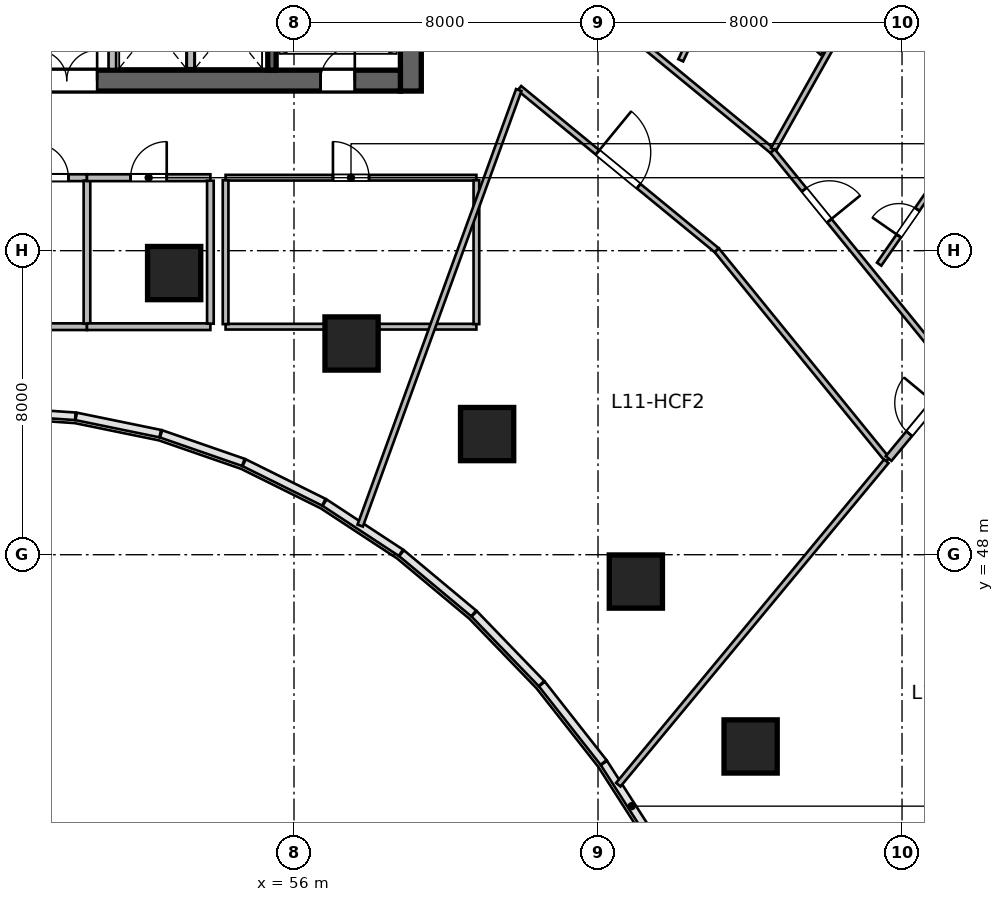
"""IFC4 building model, lengths in metres.
Left out: names, types, materials, properties, quantities, classifications, styles, units other than length and angle.
Written with IfcOpenShell. Run it as: python <this file> out.ifc"""

import sys

from ifc_helpers import new_model, si_unit, direction, frame, frame_2d, origin, origin_2d, place, context, subcontext, project, spatial, rectangle, circle, extrude, source, transform, mapped, element, fill, save


model = new_model("IFC4")
c1 = context("Model", 3, precision=1e-05, world=origin(), true_north=direction((0.0, 1.0)))
c2 = subcontext(c1, "Body", "Model", "MODEL_VIEW")
j1 = project(units=[si_unit("LENGTHUNIT", "METRE"), si_unit("PLANEANGLEUNIT", "RADIAN")], contexts=[c1])
p1 = place(None, origin())
s1 = spatial("IfcSite", under=j1, at=p1, CompositionType="ELEMENT")
p2 = place(p1, origin())
s2 = spatial("IfcBuilding", under=s1, at=p2, CompositionType="ELEMENT")
p3 = place(p2, frame((0.0, 0.0, 53.4)))
s3 = spatial("IfcBuildingStorey", under=s2, at=p3, CompositionType="ELEMENT", Elevation=53.4)
m1 = source(origin(), c2, "Body", "SweptSolid", [
    extrude(rectangle(XDim=12.0, YDim=0.55, at=frame_2d((6.0, 0.0))), origin(), (0.0, 0.0, 1.0), 3.6),
])
p4 = place(p3, frame((59.075, 60.2, 0.0), z_axis=(0.0, 0.0, 1.0), x_axis=(0.0, 1.0, 0.0)))
e1 = element("IfcWall", 1, at=p4, inside=s3, PredefinedType="SHEAR", context=c2, shape_type="MappedRepresentation", body=[
    mapped(m1, transform((0.0, 0.0, 0.0), scale=1.0)),
])
m2 = source(origin(), c2, "Body", "SweptSolid", [
    extrude(rectangle(XDim=21.6, YDim=0.55, at=frame_2d((10.8, 0.0))), origin(), (0.0, 0.0, 1.0), 3.6),
])
p5 = place(p3, frame((37.2, 60.475, 0.0), z_axis=(0.0, 0.0, 1.0), x_axis=(1.0, 0.0, 0.0)))
e2 = element("IfcWall", 2, at=p5, inside=s3, PredefinedType="SHEAR", context=c2, shape_type="MappedRepresentation", body=[
    mapped(m2, transform((0.0, 0.0, 0.0), scale=1.0)),
])
p6 = place(p5, frame((1.1, 0.0, 0.0)))
e3 = element("IfcOpeningElement", 3, at=p6, cuts=e2, PredefinedType="OPENING", context=c2, shape_type="SweptSolid", body=[
    extrude(rectangle(XDim=1.15, YDim=2.15, at=frame_2d((0.575, 1.075))), frame((0.0, 0.285, 0.0), z_axis=(0.0, -1.0, 0.0), x_axis=(1.0, 0.0, 0.0)), (0.0, 0.0, 1.0), 0.57),
])
p7 = place(p5, frame((19.5, 0.0, 0.0)))
e4 = element("IfcOpeningElement", 4, at=p7, cuts=e2, PredefinedType="OPENING", context=c2, shape_type="SweptSolid", body=[
    extrude(rectangle(XDim=0.9, YDim=2.1, at=frame_2d((0.45, 1.05))), frame((0.0, 0.285, 0.0), z_axis=(0.0, -1.0, 0.0), x_axis=(1.0, 0.0, 0.0)), (0.0, 0.0, 1.0), 0.57),
])
p8 = place(p5, frame((12.02, 0.0, 0.0)))
e5 = element("IfcOpeningElement", 5, at=p8, cuts=e2, PredefinedType="OPENING", context=c2, shape_type="SweptSolid", body=[
    extrude(rectangle(XDim=1.6, YDim=2.15, at=frame_2d((0.8, 1.075))), frame((0.0, 0.285, 0.0), z_axis=(0.0, -1.0, 0.0), x_axis=(1.0, 0.0, 0.0)), (0.0, 0.0, 1.0), 0.57),
])
m3 = source(origin(), c2, "Body", "SweptSolid", [
    extrude(rectangle(XDim=10.9, YDim=0.22, at=frame_2d((5.45, 0.0))), origin(), (0.0, 0.0, 1.0), 3.6),
])
p9 = place(p3, frame((55.42, 60.75, 0.0), z_axis=(0.0, 0.0, 1.0), x_axis=(0.0, 1.0, 0.0)))
e6 = element("IfcWall", 6, at=p9, inside=s3, PredefinedType="SHEAR", context=c2, shape_type="MappedRepresentation", body=[
    mapped(m3, transform((0.0, 0.0, 0.0), scale=1.0)),
])
p10 = place(p9, frame((9.495, 0.0, 0.0)))
e7 = element("IfcOpeningElement", 7, at=p10, cuts=e6, PredefinedType="OPENING", context=c2, shape_type="SweptSolid", body=[
    extrude(rectangle(XDim=1.15, YDim=2.15, at=frame_2d((0.575, 1.075))), frame((0.0, 0.12, 0.0), z_axis=(0.0, -1.0, 0.0), x_axis=(1.0, 0.0, 0.0)), (0.0, 0.0, 1.0), 0.24),
])
m4 = source(origin(), c2, "Body", "SweptSolid", [
    extrude(circle(Radius=0.7, at=origin_2d()), origin(), (0.0, 0.0, 1.0), 3.6),
])
for number, where, z_axis, x_axis in (
    (8, (52.846, 55.411, 0.0), (0.0, 0.0, 1.0), (0.143, 0.99, 0.0)),
    (9, (57.515, 53.558, 0.0), (0.0, 0.0, 1.0), (0.289, 0.957, 0.0)),
    (10, (61.082, 51.175, 0.0), (0.0, 0.0, 1.0), (0.409, 0.912, 0.0)),
    (11, (64.996, 47.294, 0.0), (0.0, 0.0, 1.0), (0.558, 0.83, 0.0)),
    (12, (68.015, 42.955, 0.0), (0.0, 0.0, 1.0), (0.691, 0.723, 0.0)),
):
    element("IfcColumn", number, at=place(p3, frame(where, z_axis=z_axis, x_axis=x_axis)), inside=s3, PredefinedType="COLUMN", context=c2, shape_type="MappedRepresentation", body=[
        mapped(m4, transform((0.0, 0.0, 0.0), scale=1.0)),
    ])
m5 = source(origin(), c2, "Body", "SweptSolid", [
    extrude(rectangle(XDim=2.24, YDim=0.2, at=frame_2d((1.12, 0.0))), origin(), (0.0, 0.0, 1.0), 3.36),
])
p11 = place(p3, frame((51.22, 60.78, 0.0), z_axis=(0.0, 0.0, 1.0), x_axis=(0.0, 1.0, 0.0)))
e13 = element("IfcWall", 13, at=p11, inside=s3, PredefinedType="SOLIDWALL", context=c2, shape_type="MappedRepresentation", body=[
    mapped(m5, transform((0.0, 0.0, 0.0), scale=1.0)),
])
m6 = source(origin(), c2, "Body", "SweptSolid", [
    extrude(rectangle(XDim=2.2, YDim=0.2, at=frame_2d((1.1, 0.0))), origin(), (0.0, 0.0, 1.0), 3.36),
])
p12 = place(p3, frame((53.28, 60.8, 0.0), z_axis=(0.0, 0.0, 1.0), x_axis=(0.0, 1.0, 0.0)))
e14 = element("IfcWall", 14, at=p12, inside=s3, PredefinedType="SOLIDWALL", context=c2, shape_type="MappedRepresentation", body=[
    mapped(m6, transform((0.0, 0.0, 0.0), scale=1.0)),
])
m7 = source(origin(), c2, "Body", "SweptSolid", [
    extrude(rectangle(XDim=4.176, YDim=0.175, at=frame_2d((2.088, 0.0))), origin(), (0.0, 0.0, 1.0), 3.36),
])
p13 = place(p3, frame((46.376, 54.0, 0.0), z_axis=(0.0, 0.0, 1.0), x_axis=(1.0, 0.0, 0.0)))
e15 = element("IfcWall", 15, at=p13, inside=s3, PredefinedType="PARTITIONING", context=c2, shape_type="MappedRepresentation", body=[
    mapped(m7, transform((0.0, 0.0, 0.0), scale=1.0)),
])
m8 = source(origin(), c2, "Body", "SweptSolid", [
    extrude(rectangle(XDim=4.176, YDim=0.18, at=frame_2d((2.088, 0.0))), origin(), (0.0, 0.0, 1.0), 3.36),
])
p14 = place(p3, frame((46.376, 57.92, 0.0), z_axis=(0.0, 0.0, 1.0), x_axis=(1.0, 0.0, 0.0)))
e16 = element("IfcWall", 16, at=p14, inside=s3, PredefinedType="PLUMBINGWALL", context=c2, shape_type="MappedRepresentation", body=[
    mapped(m8, transform((0.0, 0.0, 0.0), scale=1.0)),
])
p15 = place(p14, frame((2.788, 0.0, 0.0)))
e17 = element("IfcOpeningElement", 17, at=p15, cuts=e16, PredefinedType="OPENING", context=c2, shape_type="SweptSolid", body=[
    extrude(rectangle(XDim=0.9, YDim=2.08, at=frame_2d((0.45, 1.04))), frame((0.0, 0.1, 0.0), z_axis=(0.0, -1.0, 0.0), x_axis=(1.0, 0.0, 0.0)), (0.0, 0.0, 1.0), 0.2),
])
m9 = source(origin(), c2, "Body", "SweptSolid", [
    extrude(rectangle(XDim=3.763, YDim=0.175, at=frame_2d((1.881, 0.0))), origin(), (0.0, 0.0, 1.0), 3.36),
])
p16 = place(p3, frame((50.552, 54.079, 0.0), z_axis=(0.0, 0.0, 1.0), x_axis=(0.0, 1.0, 0.0)))
e18 = element("IfcWall", 18, at=p16, inside=s3, PredefinedType="PARTITIONING", context=c2, shape_type="MappedRepresentation", body=[
    mapped(m9, transform((0.0, 0.0, 0.0), scale=1.0)),
])
m10 = source(origin(), c2, "Body", "SweptSolid", [
    extrude(rectangle(XDim=3.248, YDim=0.175, at=frame_2d((1.624, 0.0))), origin(), (0.0, 0.0, 1.0), 3.36),
])
p17 = place(p3, frame((50.552, 54.0, 0.0), z_axis=(0.0, 0.0, 1.0), x_axis=(1.0, 0.0, 0.0)))
e19 = element("IfcWall", 19, at=p17, inside=s3, PredefinedType="PARTITIONING", context=c2, shape_type="MappedRepresentation", body=[
    mapped(m10, transform((0.0, 0.0, 0.0), scale=1.0)),
])
m11 = source(origin(), c2, "Body", "SweptSolid", [
    extrude(rectangle(XDim=3.248, YDim=0.18, at=frame_2d((1.624, 0.0))), origin(), (0.0, 0.0, 1.0), 3.36),
])
p18 = place(p3, frame((50.552, 57.92, 0.0), z_axis=(0.0, 0.0, 1.0), x_axis=(1.0, 0.0, 0.0)))
e20 = element("IfcWall", 20, at=p18, inside=s3, PredefinedType="PLUMBINGWALL", context=c2, shape_type="MappedRepresentation", body=[
    mapped(m11, transform((0.0, 0.0, 0.0), scale=1.0)),
])
p19 = place(p18, frame((1.149, 0.0, 0.0)))
e21 = element("IfcOpeningElement", 21, at=p19, cuts=e20, PredefinedType="OPENING", context=c2, shape_type="SweptSolid", body=[
    extrude(rectangle(XDim=0.95, YDim=2.12, at=frame_2d((0.475, 1.06))), frame((0.0, 0.1, 0.0), z_axis=(0.0, -1.0, 0.0), x_axis=(1.0, 0.0, 0.0)), (0.0, 0.0, 1.0), 0.2),
])
p20 = place(p3, frame((53.8, 54.079, 0.0), z_axis=(0.0, 0.0, 1.0), x_axis=(0.0, 1.0, 0.0)))
e22 = element("IfcWall", 22, at=p20, inside=s3, PredefinedType="PARTITIONING", context=c2, shape_type="MappedRepresentation", body=[
    mapped(m9, transform((0.0, 0.0, 0.0), scale=1.0)),
])
m12 = source(origin(), c2, "Body", "SweptSolid", [
    extrude(rectangle(XDim=6.6, YDim=0.15, at=frame_2d((3.3, 0.0))), origin(), (0.0, 0.0, 1.0), 2.803),
])
p21 = place(p3, frame((54.2, 54.0, 0.0), z_axis=(0.0, 0.0, 1.0), x_axis=(1.0, 0.0, 0.0)))
e23 = element("IfcWall", 23, at=p21, inside=s3, PredefinedType="PARTITIONING", context=c2, shape_type="MappedRepresentation", body=[
    mapped(m12, transform((0.0, 0.0, 0.0), scale=1.0)),
])
m13 = source(origin(), c2, "Body", "SweptSolid", [
    extrude(rectangle(XDim=6.6, YDim=0.15, at=frame_2d((3.3, 0.0))), origin(), (0.0, 0.0, 1.0), 3.36),
])
p22 = place(p3, frame((54.2, 57.92, 0.0), z_axis=(0.0, 0.0, 1.0), x_axis=(1.0, 0.0, 0.0)))
e24 = element("IfcWall", 24, at=p22, inside=s3, PredefinedType="PARTITIONING", context=c2, shape_type="MappedRepresentation", body=[
    mapped(m13, transform((0.0, 0.0, 0.0), scale=1.0)),
])
p23 = place(p22, frame((2.825, 0.0, 0.0)))
e25 = element("IfcOpeningElement", 25, at=p23, cuts=e24, PredefinedType="OPENING", context=c2, shape_type="SweptSolid", body=[
    extrude(rectangle(XDim=0.95, YDim=2.1, at=frame_2d((0.475, 1.05))), frame((0.0, 0.085, 0.0), z_axis=(0.0, -1.0, 0.0), x_axis=(1.0, 0.0, 0.0)), (0.0, 0.0, 1.0), 0.17),
])
m14 = source(origin(), c2, "Body", "SweptSolid", [
    extrude(rectangle(XDim=3.785, YDim=0.15, at=frame_2d((1.893, 0.0))), origin(), (0.0, 0.0, 1.0), 3.36),
])
for number, where, z_axis, x_axis in (
    (26, (54.2, 54.067, 0.0), (0.0, 0.0, 1.0), (0.0, 1.0, 0.0)),
    (27, (60.8, 54.067, 0.0), (0.0, 0.0, 1.0), (0.0, 1.0, 0.0)),
):
    element("IfcWall", number, at=place(p3, frame(where, z_axis=z_axis, x_axis=x_axis)), inside=s3, PredefinedType="PARTITIONING", context=c2, shape_type="MappedRepresentation", body=[
        mapped(m14, transform((0.0, 0.0, 0.0), scale=1.0)),
    ])
m15 = source(origin(), c2, "Body", "SweptSolid", [
    extrude(rectangle(XDim=7.237, YDim=0.15, at=frame_2d((3.618, 0.0))), origin(), (0.0, 0.0, 1.0), 3.36),
])
p24 = place(p3, frame((63.001, 63.214, 0.0), z_axis=(0.0, 0.0, 1.0), x_axis=(0.772813707793, -0.634632943557, 0.0)))
e28 = element("IfcWall", 28, at=p24, inside=s3, PredefinedType="PARTITIONING", context=c2, shape_type="MappedRepresentation", body=[
    mapped(m15, transform((0.0, 0.0, 0.0), scale=1.0)),
])
p25 = place(p24, frame((1.212, 0.0, 0.0)))
e29 = element("IfcOpeningElement", 29, at=p25, cuts=e28, PredefinedType="OPENING", context=c2, shape_type="SweptSolid", body=[
    extrude(rectangle(XDim=1.05, YDim=2.15, at=frame_2d((0.525, 1.075))), frame((0.0, 0.085, 0.0), z_axis=(0.0, -1.0, 0.0), x_axis=(1.0, 0.0, 0.0)), (0.0, 0.0, 1.0), 0.17),
])
m16 = source(origin(), c2, "Body", "SweptSolid", [
    extrude(rectangle(XDim=11.573, YDim=0.15, at=frame_2d((5.786, 0.0))), origin(), (0.0, 0.0, 1.0), 3.36),
])
p26 = place(p3, frame((68.618, 58.664, 0.0), z_axis=(0.0, 0.0, 1.0), x_axis=(0.490161073951, 0.871631872744, 0.0)))
e30 = element("IfcWall", 30, at=p26, inside=s3, PredefinedType="PARTITIONING", context=c2, shape_type="MappedRepresentation", body=[
    mapped(m16, transform((0.0, 0.0, 0.0), scale=1.0)),
])
m17 = source(origin(), c2, "Body", "SweptSolid", [
    extrude(rectangle(XDim=3.456, YDim=0.14, at=frame_2d((1.728, 0.0))), origin(), (0.0, 0.0, 1.0), 3.36),
])
p27 = place(p3, frame((67.358, 63.544, 0.0), z_axis=(0.0, 0.0, 1.0), x_axis=(0.736860870293, -0.676044420013, 0.0)))
e31 = element("IfcWall", 31, at=p27, inside=s3, PredefinedType="PARTITIONING", context=c2, shape_type="MappedRepresentation", body=[
    mapped(m17, transform((0.0, 0.0, 0.0), scale=1.0)),
])
m18 = source(origin(), c2, "Body", "SweptSolid", [
    extrude(rectangle(XDim=2.796, YDim=0.14, at=frame_2d((1.398, 0.0))), origin(), (0.0, 0.0, 1.0), 3.36),
])
p28 = place(p3, frame((66.177, 61.009, 0.0), z_axis=(0.0, 0.0, 1.0), x_axis=(0.422316594955, 0.906448395456, 0.0)))
e32 = element("IfcWall", 32, at=p28, inside=s3, PredefinedType="PARTITIONING", context=c2, shape_type="MappedRepresentation", body=[
    mapped(m18, transform((0.0, 0.0, 0.0), scale=1.0)),
])
p29 = place(p28, frame((0.973, 0.0, 0.0)))
e33 = element("IfcOpeningElement", 33, at=p29, cuts=e32, PredefinedType="OPENING", context=c2, shape_type="SweptSolid", body=[
    extrude(rectangle(XDim=0.85, YDim=2.05, at=frame_2d((0.425, 1.025))), frame((0.0, 0.08, 0.0), z_axis=(0.0, -1.0, 0.0), x_axis=(1.0, 0.0, 0.0)), (0.0, 0.0, 1.0), 0.16),
])
m19 = source(origin(), c2, "Body", "SweptSolid", [
    extrude(rectangle(XDim=7.659, YDim=0.15, at=frame_2d((3.829, 0.0))), origin(), (0.0, 0.0, 1.0), 3.36),
])
p30 = place(p3, frame((68.594, 58.621, 0.0), z_axis=(0.0, 0.0, 1.0), x_axis=(0.631489868862, -0.775384127723, 0.0)))
e34 = element("IfcWall", 34, at=p30, inside=s3, PredefinedType="PARTITIONING", context=c2, shape_type="MappedRepresentation", body=[
    mapped(m19, transform((0.0, 0.0, 0.0), scale=1.0)),
])
p31 = place(p30, frame((1.313, 0.0, 0.0)))
e35 = element("IfcOpeningElement", 35, at=p31, cuts=e34, PredefinedType="OPENING", context=c2, shape_type="SweptSolid", body=[
    extrude(rectangle(XDim=1.05, YDim=2.15, at=frame_2d((0.525, 1.075))), frame((0.0, 0.085, 0.0), z_axis=(0.0, -1.0, 0.0), x_axis=(1.0, 0.0, 0.0)), (0.0, 0.0, 1.0), 0.17),
])
m20 = source(origin(), c2, "Body", "SweptSolid", [
    extrude(rectangle(XDim=2.663, YDim=0.14, at=frame_2d((1.332, 0.0))), origin(), (0.0, 0.0, 1.0), 3.36),
])
p32 = place(p3, frame((71.397, 55.645, 0.0), z_axis=(0.0, 0.0, 1.0), x_axis=(0.570905989724, 0.821015438891, 0.0)))
e36 = element("IfcWall", 36, at=p32, inside=s3, PredefinedType="PARTITIONING", context=c2, shape_type="MappedRepresentation", body=[
    mapped(m20, transform((0.0, 0.0, 0.0), scale=1.0)),
])
p33 = place(p32, frame((0.906, 0.0, 0.0)))
e37 = element("IfcOpeningElement", 37, at=p33, cuts=e36, PredefinedType="OPENING", context=c2, shape_type="SweptSolid", body=[
    extrude(rectangle(XDim=0.85, YDim=2.05, at=frame_2d((0.425, 1.025))), frame((0.0, 0.08, 0.0), z_axis=(0.0, -1.0, 0.0), x_axis=(1.0, 0.0, 0.0)), (0.0, 0.0, 1.0), 0.16),
])
m21 = source(origin(), c2, "Body", "SweptSolid", [
    extrude(rectangle(XDim=6.721, YDim=0.15, at=frame_2d((3.361, 0.0))), origin(), (0.0, 0.0, 1.0), 3.36),
])
p34 = place(p3, frame((61.931, 60.275, 0.0), z_axis=(0.0, 0.0, 1.0), x_axis=(0.772828051199, -0.63461547671, 0.0)))
e38 = element("IfcWall", 38, at=p34, inside=s3, PredefinedType="PARTITIONING", context=c2, shape_type="MappedRepresentation", body=[
    mapped(m21, transform((0.0, 0.0, 0.0), scale=1.0)),
])
p35 = place(p34, frame((2.66, 0.0, 0.0)))
e39 = element("IfcOpeningElement", 39, at=p35, cuts=e38, PredefinedType="OPENING", context=c2, shape_type="SweptSolid", body=[
    extrude(rectangle(XDim=1.4, YDim=2.15, at=frame_2d((0.7, 1.075))), frame((0.0, 0.085, 0.0), z_axis=(0.0, -1.0, 0.0), x_axis=(1.0, 0.0, 0.0)), (0.0, 0.0, 1.0), 0.17),
])
m22 = source(origin(), c2, "Body", "SweptSolid", [
    extrude(rectangle(XDim=7.113, YDim=0.15, at=frame_2d((3.556, 0.0))), origin(), (0.0, 0.0, 1.0), 3.36),
])
p36 = place(p3, frame((67.126, 56.01, 0.0), z_axis=(0.0, 0.0, 1.0), x_axis=(0.63149032532, -0.775383755974, 0.0)))
e40 = element("IfcWall", 40, at=p36, inside=s3, PredefinedType="PARTITIONING", context=c2, shape_type="MappedRepresentation", body=[
    mapped(m22, transform((0.0, 0.0, 0.0), scale=1.0)),
])
m23 = source(origin(), c2, "Body", "SweptSolid", [
    extrude(rectangle(XDim=12.196, YDim=0.15, at=frame_2d((6.098, 0.0))), origin(), (0.0, 0.0, 1.0), 3.36),
])
p37 = place(p3, frame((57.742, 48.766, 0.0), z_axis=(0.0, 0.0, 1.0), x_axis=(0.342022711534, 0.939691686031, 0.0)))
e41 = element("IfcWall", 41, at=p37, inside=s3, PredefinedType="PARTITIONING", context=c2, shape_type="MappedRepresentation", body=[
    mapped(m23, transform((0.0, 0.0, 0.0), scale=1.0)),
])
m24 = source(origin(), c2, "Body", "SweptSolid", [
    extrude(rectangle(XDim=11.053, YDim=0.15, at=frame_2d((5.527, 0.0))), origin(), (0.0, 0.0, 1.0), 3.36),
])
p38 = place(p3, frame((64.534, 41.949, 0.0), z_axis=(0.0, 0.0, 1.0), x_axis=(0.638131235571, 0.769927611005, 0.0)))
e42 = element("IfcWall", 42, at=p38, inside=s3, PredefinedType="PARTITIONING", context=c2, shape_type="MappedRepresentation", body=[
    mapped(m24, transform((0.0, 0.0, 0.0), scale=1.0)),
])
m25 = source(origin(), c2, "Body", "SweptSolid", [
    extrude(rectangle(XDim=2.748, YDim=0.195, at=frame_2d((1.374, 0.0))), origin(), (0.0, 0.0, 1.0), 3.36),
])
p39 = place(p3, frame((71.647, 50.531, 0.0), z_axis=(0.0, 0.0, 1.0), x_axis=(0.638111168284, 0.769944242729, 0.0)))
e43 = element("IfcWall", 43, at=p39, inside=s3, PredefinedType="PARTITIONING", context=c2, shape_type="MappedRepresentation", body=[
    mapped(m25, transform((0.0, 0.0, 0.0), scale=1.0)),
])
p40 = place(p39, frame((0.849, 0.0, 0.0)))
e44 = element("IfcOpeningElement", 44, at=p40, cuts=e43, PredefinedType="OPENING", context=c2, shape_type="SweptSolid", body=[
    extrude(rectangle(XDim=1.05, YDim=2.15, at=frame_2d((0.525, 1.075))), frame((0.0, 0.107, 0.0), z_axis=(0.0, -1.0, 0.0), x_axis=(1.0, 0.0, 0.0)), (0.0, 0.0, 1.0), 0.215),
])
m26 = source(origin(), c2, "Body", "SweptSolid", [
    extrude(rectangle(XDim=0.9, YDim=2.1, at=frame_2d((0.45, 1.05))), frame((0.0, 0.025, 0.0), z_axis=(0.0, -1.0, 0.0), x_axis=(1.0, 0.0, 0.0)), (0.0, 0.0, 1.0), 0.05),
])
p41 = place(p7, origin())
e45 = element("IfcDoor", 45, at=p41, inside=s3, OperationType="SINGLE_SWING_RIGHT", PredefinedType="DOOR", context=c2, shape_type="MappedRepresentation", body=[
    mapped(m26, transform((0.0, 0.0, 0.0), scale=1.0)),
])
fill(e4, e45)
m27 = source(origin(), c2, "Body", "SweptSolid", [
    extrude(rectangle(XDim=1.6, YDim=2.15, at=frame_2d((0.8, 1.075))), frame((0.0, 0.025, 0.0), z_axis=(0.0, -1.0, 0.0), x_axis=(1.0, 0.0, 0.0)), (0.0, 0.0, 1.0), 0.05),
])
p42 = place(p8, origin())
e46 = element("IfcDoor", 46, at=p42, inside=s3, OperationType="DOUBLE_DOOR_SINGLE_SWING", PredefinedType="DOOR", context=c2, shape_type="MappedRepresentation", body=[
    mapped(m27, transform((0.0, 0.0, 0.0), scale=1.0)),
])
fill(e5, e46)
m28 = source(origin(), c2, "Body", "SweptSolid", [
    extrude(rectangle(XDim=0.9, YDim=2.08, at=frame_2d((0.45, 1.04))), frame((0.0, 0.025, 0.0), z_axis=(0.0, -1.0, 0.0), x_axis=(1.0, 0.0, 0.0)), (0.0, 0.0, 1.0), 0.05),
])
p43 = place(p15, origin())
e47 = element("IfcDoor", 47, at=p43, inside=s3, OperationType="SINGLE_SWING_LEFT", PredefinedType="DOOR", context=c2, shape_type="MappedRepresentation", body=[
    mapped(m28, transform((0.0, 0.0, 0.0), scale=1.0)),
])
fill(e17, e47)
m29 = source(origin(), c2, "Body", "SweptSolid", [
    extrude(rectangle(XDim=0.95, YDim=2.12, at=frame_2d((0.475, 1.06))), frame((0.0, 0.025, 0.0), z_axis=(0.0, -1.0, 0.0), x_axis=(1.0, 0.0, 0.0)), (0.0, 0.0, 1.0), 0.05),
])
p44 = place(p19, origin())
e48 = element("IfcDoor", 48, at=p44, inside=s3, OperationType="SINGLE_SWING_RIGHT", PredefinedType="DOOR", context=c2, shape_type="MappedRepresentation", body=[
    mapped(m29, transform((0.0, 0.0, 0.0), scale=1.0)),
])
fill(e21, e48)
m30 = source(origin(), c2, "Body", "SweptSolid", [
    extrude(rectangle(XDim=0.95, YDim=2.1, at=frame_2d((0.475, 1.05))), frame((0.0, 0.025, 0.0), z_axis=(0.0, -1.0, 0.0), x_axis=(1.0, 0.0, 0.0)), (0.0, 0.0, 1.0), 0.05),
])
p45 = place(p23, origin())
e49 = element("IfcDoor", 49, at=p45, inside=s3, OperationType="SINGLE_SWING_LEFT", PredefinedType="DOOR", context=c2, shape_type="MappedRepresentation", body=[
    mapped(m30, transform((0.0, 0.0, 0.0), scale=1.0)),
])
fill(e25, e49)
m31 = source(origin(), c2, "Body", "SweptSolid", [
    extrude(rectangle(XDim=1.05, YDim=2.15, at=frame_2d((0.525, 1.075))), frame((0.0, 0.025, 0.0), z_axis=(0.0, -1.0, 0.0), x_axis=(1.0, 0.0, 0.0)), (0.0, 0.0, 1.0), 0.05),
])
p46 = place(p31, origin())
e50 = element("IfcDoor", 50, at=p46, inside=s3, OperationType="SINGLE_SWING_RIGHT", PredefinedType="DOOR", context=c2, shape_type="MappedRepresentation", body=[
    mapped(m31, transform((0.0, 0.0, 0.0), scale=1.0)),
])
fill(e35, e50)
m32 = source(origin(), c2, "Body", "SweptSolid", [
    extrude(rectangle(XDim=0.85, YDim=2.05, at=frame_2d((0.425, 1.025))), frame((0.0, 0.025, 0.0), z_axis=(0.0, -1.0, 0.0), x_axis=(1.0, 0.0, 0.0)), (0.0, 0.0, 1.0), 0.05),
])
p47 = place(p33, origin())
e51 = element("IfcDoor", 51, at=p47, inside=s3, OperationType="SINGLE_SWING_LEFT", PredefinedType="DOOR", context=c2, shape_type="MappedRepresentation", body=[
    mapped(m32, transform((0.0, 0.0, 0.0), scale=1.0)),
])
fill(e37, e51)
m33 = source(origin(), c2, "Body", "SweptSolid", [
    extrude(rectangle(XDim=1.4, YDim=2.15, at=frame_2d((0.7, 1.075))), frame((0.0, 0.025, 0.0), z_axis=(0.0, -1.0, 0.0), x_axis=(1.0, 0.0, 0.0)), (0.0, 0.0, 1.0), 0.05),
])
p48 = place(p35, origin())
e52 = element("IfcDoor", 52, at=p48, inside=s3, OperationType="SINGLE_SWING_LEFT", PredefinedType="DOOR", context=c2, shape_type="MappedRepresentation", body=[
    mapped(m33, transform((0.0, 0.0, 0.0), scale=1.0)),
])
fill(e39, e52)
p49 = place(p40, origin())
e53 = element("IfcDoor", 53, at=p49, inside=s3, OperationType="SINGLE_SWING_RIGHT", PredefinedType="DOOR", context=c2, shape_type="MappedRepresentation", body=[
    mapped(m31, transform((0.0, 0.0, 0.0), scale=1.0)),
])
fill(e44, e53)
save(model, sys.argv[1])
